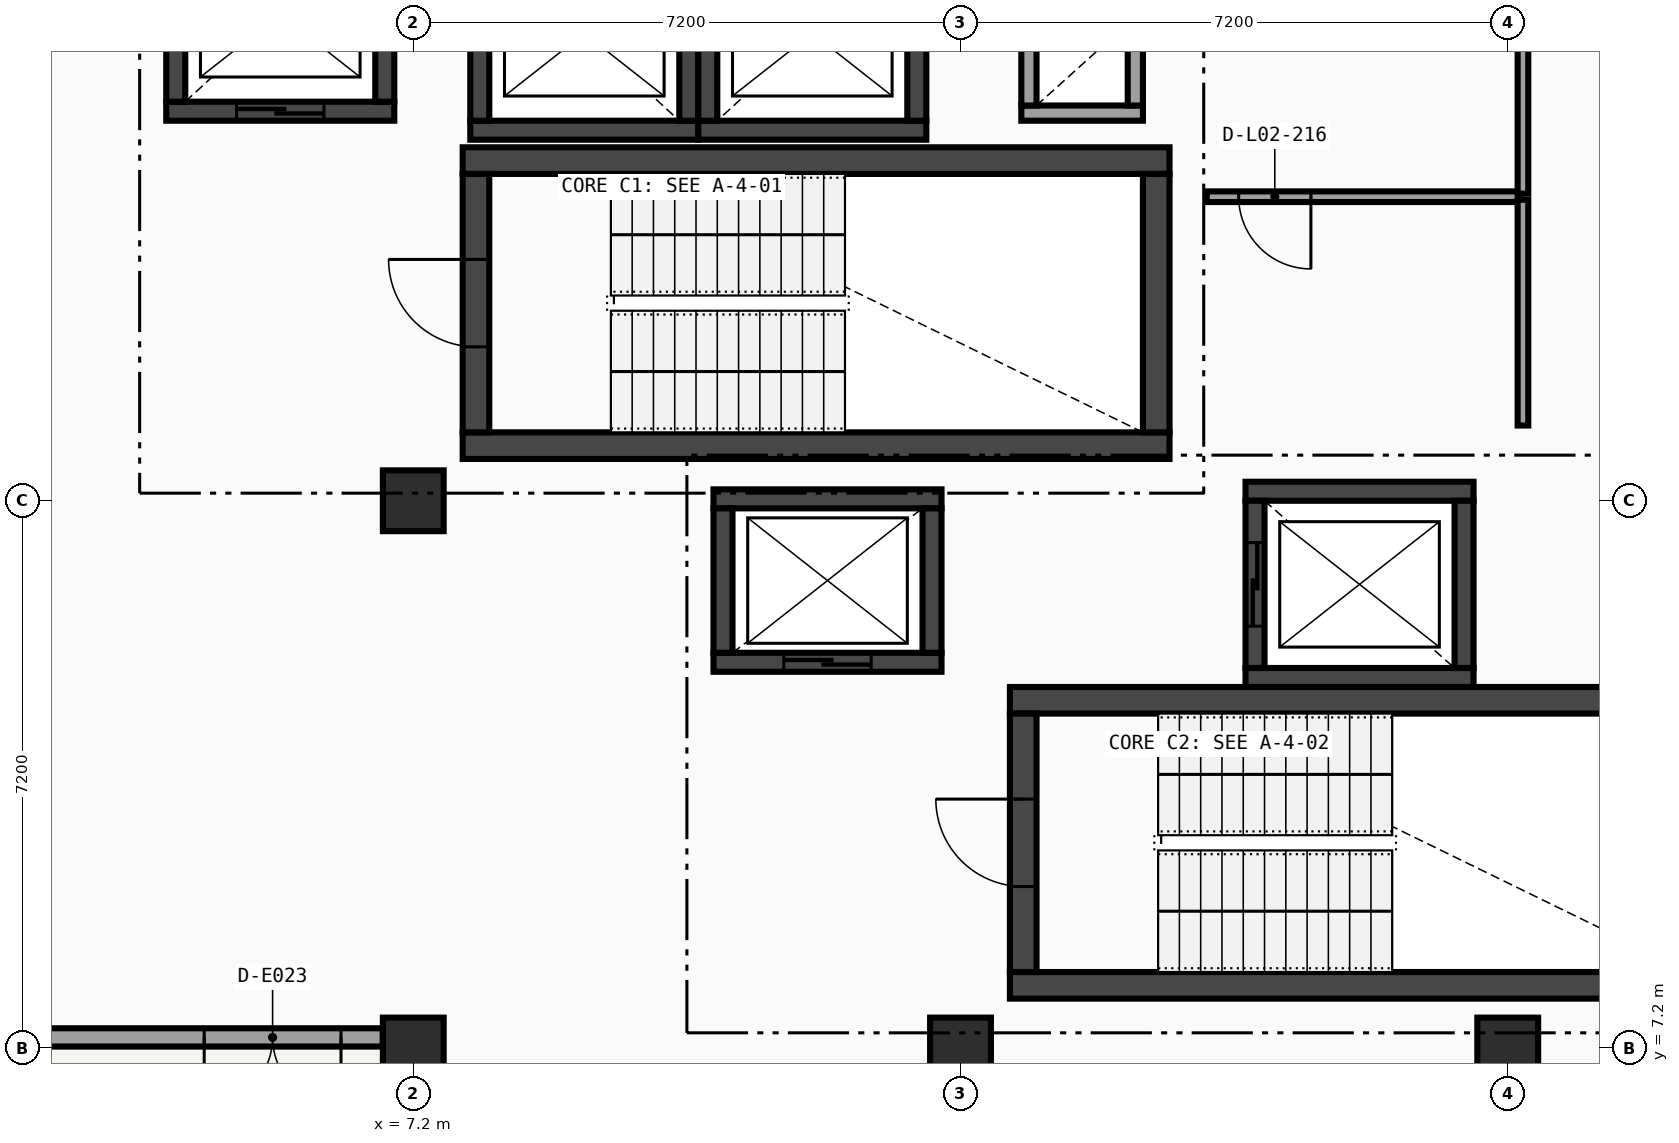
"""IFC4 building model, lengths in metres.
Left out: names, types, materials, properties, quantities, classifications, styles, units other than length and angle.
Written with IfcOpenShell. Run it as: python <this file> out.ifc"""

import sys

from ifc_helpers import new_model, si_unit, direction, frame, frame_2d, origin, origin_2d, place, context, subcontext, project, spatial, rectangle, extrude, element, fill, save


model = new_model("IFC4")
c1 = context("Model", 3, precision=1e-05, world=origin(), true_north=direction((0.0, 1.0)))
c2 = subcontext(c1, "Body", "Model", "MODEL_VIEW")
j1 = project(units=[si_unit("LENGTHUNIT", "METRE"), si_unit("PLANEANGLEUNIT", "RADIAN")], contexts=[c1])
p1 = place(None, origin())
s1 = spatial("IfcSite", under=j1, at=p1, CompositionType="ELEMENT")
p2 = place(p1, origin())
s2 = spatial("IfcBuilding", under=s1, at=p2, CompositionType="ELEMENT")
p3 = place(p2, frame((0.0, 0.0, 10.2)))
s3 = spatial("IfcBuildingStorey", under=s2, at=p3, CompositionType="ELEMENT", Elevation=10.2)
for number, where, z_axis, x_axis in (
    (1, (7.2, 7.2, 0.0), (0.0, 0.0, 1.0), (1.0, 0.0, 0.0)),
    (2, (7.2, 14.4, 0.0), (0.0, 0.0, 1.0), (1.0, 0.0, 0.0)),
    (3, (14.4, 7.2, 0.0), (0.0, 0.0, 1.0), (1.0, 0.0, 0.0)),
    (4, (21.6, 7.2, 0.0), (0.0, 0.0, 1.0), (1.0, 0.0, 0.0)),
):
    element("IfcColumn", number, at=place(p3, frame(where, z_axis=z_axis, x_axis=x_axis)), inside=s3, PredefinedType="COLUMN", context=c2, shape_type="SweptSolid", body=[
        extrude(rectangle(XDim=0.8, YDim=0.8, at=origin_2d()), origin(), (0.0, 0.0, 1.0), 4.5),
    ])
p4 = place(p3, frame((6.799, 7.34, 0.0), z_axis=(0.0, 0.0, 1.0), x_axis=(-1.0, 0.0, 0.0)))
e5 = element("IfcWall", 5, at=p4, inside=s3, PredefinedType="SOLIDWALL", context=c2, shape_type="SweptSolid", body=[
    extrude(rectangle(XDim=6.398, YDim=0.24, at=frame_2d((3.199, 0.0))), origin(), (0.0, 0.0, 1.0), 3.471),
])
p5 = place(p4, frame((0.55, 0.0, 0.0)))
e6 = element("IfcOpeningElement", 6, at=p5, cuts=e5, PredefinedType="OPENING", context=c2, shape_type="SweptSolid", body=[
    extrude(rectangle(XDim=1.8, YDim=2.15, at=frame_2d((0.9, 1.075))), frame((0.0, 0.13, 0.0), z_axis=(0.0, -1.0, 0.0), x_axis=(1.0, 0.0, 0.0)), (0.0, 0.0, 1.0), 0.26),
])
p6 = place(p4, frame((4.548, 0.0, 0.85)))
e7 = element("IfcOpeningElement", 7, at=p6, cuts=e5, PredefinedType="OPENING", context=c2, shape_type="SweptSolid", body=[
    extrude(rectangle(XDim=1.35, YDim=1.85, at=frame_2d((0.675, 0.925))), frame((0.0, 0.13, 0.0), z_axis=(0.0, -1.0, 0.0), x_axis=(1.0, 0.0, 0.0)), (0.0, 0.0, 1.0), 0.26),
])
for number, where, z_axis, x_axis in (
    (8, (7.85, 15.125, 0.0), (0.0, 0.0, 1.0), (1.0, 0.0, 0.0)),
    (9, (17.15, 18.875, 0.0), (0.0, 0.0, 1.0), (-1.0, 0.0, 0.0)),
):
    element("IfcWall", number, at=place(p3, frame(where, z_axis=z_axis, x_axis=x_axis)), inside=s3, PredefinedType="SHEAR", context=c2, shape_type="SweptSolid", body=[
        extrude(rectangle(XDim=9.3, YDim=0.35, at=frame_2d((4.65, 0.0))), origin(), (0.0, 0.0, 1.0), 4.24),
    ])
p7 = place(p3, frame((8.025, 18.7, 0.0), z_axis=(0.0, 0.0, 1.0), x_axis=(0.0, -1.0, 0.0)))
e10 = element("IfcWall", 10, at=p7, inside=s3, PredefinedType="SHEAR", context=c2, shape_type="SweptSolid", body=[
    extrude(rectangle(XDim=3.4, YDim=0.35, at=frame_2d((1.7, 0.0))), origin(), (0.0, 0.0, 1.0), 4.24),
])
p8 = place(p7, frame((1.125, 0.0, 0.0)))
e11 = element("IfcOpeningElement", 11, at=p8, cuts=e10, PredefinedType="OPENING", context=c2, shape_type="SweptSolid", body=[
    extrude(rectangle(XDim=1.15, YDim=2.1, at=frame_2d((0.575, 1.05))), frame((0.0, 0.185, 0.0), z_axis=(0.0, -1.0, 0.0), x_axis=(1.0, 0.0, 0.0)), (0.0, 0.0, 1.0), 0.37),
])
p9 = place(p3, frame((16.975, 15.3, 0.0), z_axis=(0.0, 0.0, 1.0), x_axis=(0.0, 1.0, 0.0)))
e12 = element("IfcWall", 12, at=p9, inside=s3, PredefinedType="SHEAR", context=c2, shape_type="SweptSolid", body=[
    extrude(rectangle(XDim=3.4, YDim=0.35, at=frame_2d((1.7, 0.0))), origin(), (0.0, 0.0, 1.0), 4.24),
])
p10 = place(p3, frame((3.95, 19.525, 0.0), z_axis=(0.0, 0.0, 1.0), x_axis=(1.0, 0.0, 0.0)))
e13 = element("IfcWall", 13, at=p10, inside=s3, PredefinedType="SHEAR", context=c2, shape_type="SweptSolid", body=[
    extrude(rectangle(XDim=3.0, YDim=0.25, at=frame_2d((1.5, 0.0))), origin(), (0.0, 0.0, 1.0), 4.24),
])
p11 = place(p10, frame((0.925, 0.0, 0.0)))
e14 = element("IfcOpeningElement", 14, at=p11, cuts=e13, PredefinedType="OPENING", context=c2, shape_type="SweptSolid", body=[
    extrude(rectangle(XDim=1.15, YDim=2.1, at=frame_2d((0.575, 1.05))), frame((0.0, 0.135, 0.0), z_axis=(0.0, -1.0, 0.0), x_axis=(1.0, 0.0, 0.0)), (0.0, 0.0, 1.0), 0.27),
])
for number, where, z_axis, x_axis in (
    (15, (4.075, 21.95, 0.0), (0.0, 0.0, 1.0), (0.0, -1.0, 0.0)),
    (16, (6.825, 19.65, 0.0), (0.0, 0.0, 1.0), (0.0, 1.0, 0.0)),
):
    element("IfcWall", number, at=place(p3, frame(where, z_axis=z_axis, x_axis=x_axis)), inside=s3, PredefinedType="SHEAR", context=c2, shape_type="SweptSolid", body=[
        extrude(rectangle(XDim=2.3, YDim=0.25, at=frame_2d((1.15, 0.0))), origin(), (0.0, 0.0, 1.0), 4.24),
    ])
p12 = place(p3, frame((7.95, 19.275, 0.0), z_axis=(0.0, 0.0, 1.0), x_axis=(1.0, 0.0, 0.0)))
e17 = element("IfcWall", 17, at=p12, inside=s3, PredefinedType="SHEAR", context=c2, shape_type="SweptSolid", body=[
    extrude(rectangle(XDim=3.0, YDim=0.25, at=frame_2d((1.5, 0.0))), origin(), (0.0, 0.0, 1.0), 4.24),
])
for number, where, z_axis, x_axis in (
    (18, (8.075, 21.7, 0.0), (0.0, 0.0, 1.0), (0.0, -1.0, 0.0)),
    (19, (10.825, 19.4, 0.0), (0.0, 0.0, 1.0), (0.0, 1.0, 0.0)),
):
    element("IfcWall", number, at=place(p3, frame(where, z_axis=z_axis, x_axis=x_axis)), inside=s3, PredefinedType="SHEAR", context=c2, shape_type="SweptSolid", body=[
        extrude(rectangle(XDim=2.3, YDim=0.25, at=frame_2d((1.15, 0.0))), origin(), (0.0, 0.0, 1.0), 4.24),
    ])
p13 = place(p3, frame((10.95, 19.275, 0.0), z_axis=(0.0, 0.0, 1.0), x_axis=(1.0, 0.0, 0.0)))
e20 = element("IfcWall", 20, at=p13, inside=s3, PredefinedType="SHEAR", context=c2, shape_type="SweptSolid", body=[
    extrude(rectangle(XDim=3.0, YDim=0.25, at=frame_2d((1.5, 0.0))), origin(), (0.0, 0.0, 1.0), 4.24),
])
for number, where, z_axis, x_axis in (
    (21, (11.075, 21.7, 0.0), (0.0, 0.0, 1.0), (0.0, -1.0, 0.0)),
    (22, (13.825, 19.4, 0.0), (0.0, 0.0, 1.0), (0.0, 1.0, 0.0)),
):
    element("IfcWall", number, at=place(p3, frame(where, z_axis=z_axis, x_axis=x_axis)), inside=s3, PredefinedType="SHEAR", context=c2, shape_type="SweptSolid", body=[
        extrude(rectangle(XDim=2.3, YDim=0.25, at=frame_2d((1.15, 0.0))), origin(), (0.0, 0.0, 1.0), 4.24),
    ])
for number, where, z_axis, x_axis in (
    (23, (15.05, 8.025, 0.0), (0.0, 0.0, 1.0), (1.0, 0.0, 0.0)),
    (24, (24.35, 11.775, 0.0), (0.0, 0.0, 1.0), (-1.0, 0.0, 0.0)),
):
    element("IfcWall", number, at=place(p3, frame(where, z_axis=z_axis, x_axis=x_axis)), inside=s3, PredefinedType="SHEAR", context=c2, shape_type="SweptSolid", body=[
        extrude(rectangle(XDim=9.3, YDim=0.35, at=frame_2d((4.65, 0.0))), origin(), (0.0, 0.0, 1.0), 4.24),
    ])
p14 = place(p3, frame((15.225, 11.6, 0.0), z_axis=(0.0, 0.0, 1.0), x_axis=(0.0, -1.0, 0.0)))
e25 = element("IfcWall", 25, at=p14, inside=s3, PredefinedType="SHEAR", context=c2, shape_type="SweptSolid", body=[
    extrude(rectangle(XDim=3.4, YDim=0.35, at=frame_2d((1.7, 0.0))), origin(), (0.0, 0.0, 1.0), 4.24),
])
p15 = place(p14, frame((1.125, 0.0, 0.0)))
e26 = element("IfcOpeningElement", 26, at=p15, cuts=e25, PredefinedType="OPENING", context=c2, shape_type="SweptSolid", body=[
    extrude(rectangle(XDim=1.15, YDim=2.1, at=frame_2d((0.575, 1.05))), frame((0.0, 0.185, 0.0), z_axis=(0.0, -1.0, 0.0), x_axis=(1.0, 0.0, 0.0)), (0.0, 0.0, 1.0), 0.37),
])
p16 = place(p3, frame((11.15, 12.275, 0.0), z_axis=(0.0, 0.0, 1.0), x_axis=(1.0, 0.0, 0.0)))
e27 = element("IfcWall", 27, at=p16, inside=s3, PredefinedType="SHEAR", context=c2, shape_type="SweptSolid", body=[
    extrude(rectangle(XDim=3.0, YDim=0.25, at=frame_2d((1.5, 0.0))), origin(), (0.0, 0.0, 1.0), 4.24),
])
p17 = place(p16, frame((0.925, 0.0, 0.0)))
e28 = element("IfcOpeningElement", 28, at=p17, cuts=e27, PredefinedType="OPENING", context=c2, shape_type="SweptSolid", body=[
    extrude(rectangle(XDim=1.15, YDim=2.1, at=frame_2d((0.575, 1.05))), frame((0.0, 0.135, 0.0), z_axis=(0.0, -1.0, 0.0), x_axis=(1.0, 0.0, 0.0)), (0.0, 0.0, 1.0), 0.27),
])
p18 = place(p3, frame((14.15, 14.425, 0.0), z_axis=(0.0, 0.0, 1.0), x_axis=(-1.0, 0.0, 0.0)))
e29 = element("IfcWall", 29, at=p18, inside=s3, PredefinedType="SHEAR", context=c2, shape_type="SweptSolid", body=[
    extrude(rectangle(XDim=3.0, YDim=0.25, at=frame_2d((1.5, 0.0))), origin(), (0.0, 0.0, 1.0), 4.24),
])
for number, where, z_axis, x_axis in (
    (30, (11.275, 14.3, 0.0), (0.0, 0.0, 1.0), (0.0, -1.0, 0.0)),
    (31, (14.025, 12.4, 0.0), (0.0, 0.0, 1.0), (0.0, 1.0, 0.0)),
):
    element("IfcWall", number, at=place(p3, frame(where, z_axis=z_axis, x_axis=x_axis)), inside=s3, PredefinedType="SHEAR", context=c2, shape_type="SweptSolid", body=[
        extrude(rectangle(XDim=1.9, YDim=0.25, at=frame_2d((0.95, 0.0))), origin(), (0.0, 0.0, 1.0), 4.24),
    ])
for number, where, z_axis, x_axis in (
    (32, (18.15, 12.075, 0.0), (0.0, 0.0, 1.0), (1.0, 0.0, 0.0)),
    (33, (21.15, 14.525, 0.0), (0.0, 0.0, 1.0), (-1.0, 0.0, 0.0)),
):
    element("IfcWall", number, at=place(p3, frame(where, z_axis=z_axis, x_axis=x_axis)), inside=s3, PredefinedType="SHEAR", context=c2, shape_type="SweptSolid", body=[
        extrude(rectangle(XDim=3.0, YDim=0.25, at=frame_2d((1.5, 0.0))), origin(), (0.0, 0.0, 1.0), 4.24),
    ])
p19 = place(p3, frame((18.275, 14.4, 0.0), z_axis=(0.0, 0.0, 1.0), x_axis=(0.0, -1.0, 0.0)))
e34 = element("IfcWall", 34, at=p19, inside=s3, PredefinedType="SHEAR", context=c2, shape_type="SweptSolid", body=[
    extrude(rectangle(XDim=2.2, YDim=0.25, at=frame_2d((1.1, 0.0))), origin(), (0.0, 0.0, 1.0), 4.24),
])
p20 = place(p19, frame((0.55, 0.0, 0.0)))
e35 = element("IfcOpeningElement", 35, at=p20, cuts=e34, PredefinedType="OPENING", context=c2, shape_type="SweptSolid", body=[
    extrude(rectangle(XDim=1.1, YDim=2.1, at=frame_2d((0.55, 1.05))), frame((0.0, 0.135, 0.0), z_axis=(0.0, -1.0, 0.0), x_axis=(1.0, 0.0, 0.0)), (0.0, 0.0, 1.0), 0.27),
])
p21 = place(p3, frame((21.025, 12.2, 0.0), z_axis=(0.0, 0.0, 1.0), x_axis=(0.0, 1.0, 0.0)))
e36 = element("IfcWall", 36, at=p21, inside=s3, PredefinedType="SHEAR", context=c2, shape_type="SweptSolid", body=[
    extrude(rectangle(XDim=2.2, YDim=0.25, at=frame_2d((1.1, 0.0))), origin(), (0.0, 0.0, 1.0), 4.24),
])
p22 = place(p3, frame((15.2, 19.5, 0.0), z_axis=(0.0, 0.0, 1.0), x_axis=(1.0, 0.0, 0.0)))
e37 = element("IfcWall", 37, at=p22, inside=s3, PredefinedType="SOLIDWALL", context=c2, shape_type="SweptSolid", body=[
    extrude(rectangle(XDim=1.6, YDim=0.2, at=frame_2d((0.8, 0.0))), origin(), (0.0, 0.0, 1.0), 4.24),
])
for number, where, z_axis, x_axis in (
    (38, (15.3, 20.68, 0.0), (0.0, 0.0, 1.0), (0.0, -1.0, 0.0)),
    (39, (16.7, 19.6, 0.0), (0.0, 0.0, 1.0), (0.0, 1.0, 0.0)),
):
    element("IfcWall", number, at=place(p3, frame(where, z_axis=z_axis, x_axis=x_axis)), inside=s3, PredefinedType="SOLIDWALL", context=c2, shape_type="SweptSolid", body=[
        extrude(rectangle(XDim=1.08, YDim=0.2, at=frame_2d((0.54, 0.0))), origin(), (0.0, 0.0, 1.0), 4.24),
    ])
p23 = place(p3, frame((17.64, 18.4, 0.0), z_axis=(0.0, 0.0, 1.0), x_axis=(1.0, 0.0, 0.0)))
e40 = element("IfcWall", 40, at=p23, inside=s3, PredefinedType="PARTITIONING", context=c2, shape_type="SweptSolid", body=[
    extrude(rectangle(XDim=4.12, YDim=0.14, at=frame_2d((2.06, 0.0))), origin(), (0.0, 0.0, 1.0), 4.24),
])
p24 = place(p23, frame((0.42, 0.0, 0.0)))
e41 = element("IfcOpeningElement", 41, at=p24, cuts=e40, PredefinedType="OPENING", context=c2, shape_type="SweptSolid", body=[
    extrude(rectangle(XDim=0.95, YDim=2.08, at=frame_2d((0.475, 1.04))), frame((0.0, 0.08, 0.0), z_axis=(0.0, -1.0, 0.0), x_axis=(1.0, 0.0, 0.0)), (0.0, 0.0, 1.0), 0.16),
])
p25 = place(p3, frame((21.8, 15.39, 0.0), z_axis=(0.0, 0.0, 1.0), x_axis=(0.0, 1.0, 0.0)))
e42 = element("IfcWall", 42, at=p25, inside=s3, PredefinedType="PARTITIONING", context=c2, shape_type="SweptSolid", body=[
    extrude(rectangle(XDim=2.97, YDim=0.14, at=frame_2d((1.485, 0.0))), origin(), (0.0, 0.0, 1.0), 4.24),
])
p26 = place(p3, frame((21.8, 18.44, 0.0), z_axis=(0.0, 0.0, 1.0), x_axis=(0.0, 1.0, 0.0)))
e43 = element("IfcWall", 43, at=p26, inside=s3, PredefinedType="PARTITIONING", context=c2, shape_type="SweptSolid", body=[
    extrude(rectangle(XDim=3.72, YDim=0.14, at=frame_2d((1.86, 0.0))), origin(), (0.0, 0.0, 1.0), 3.451),
])
p27 = place(p5, origin())
e44 = element("IfcDoor", 44, at=p27, inside=s3, OperationType="DOUBLE_DOOR_SINGLE_SWING", PredefinedType="DOOR", context=c2, shape_type="SweptSolid", body=[
    extrude(rectangle(XDim=1.8, YDim=2.15, at=frame_2d((0.9, 1.075))), frame((0.0, 0.025, 0.0), z_axis=(0.0, -1.0, 0.0), x_axis=(1.0, 0.0, 0.0)), (0.0, 0.0, 1.0), 0.05),
])
fill(e6, e44)
p28 = place(p8, frame((1.15, 0.0, 0.0), z_axis=(0.0, 0.0, 1.0), x_axis=(-1.0, 0.0, 0.0)))
e45 = element("IfcDoor", 45, at=p28, inside=s3, OperationType="SINGLE_SWING_RIGHT", PredefinedType="DOOR", context=c2, shape_type="SweptSolid", body=[
    extrude(rectangle(XDim=1.15, YDim=2.1, at=frame_2d((0.575, 1.05))), frame((0.0, 0.025, 0.0), z_axis=(0.0, -1.0, 0.0), x_axis=(1.0, 0.0, 0.0)), (0.0, 0.0, 1.0), 0.05),
])
fill(e11, e45)
p29 = place(p11, origin())
e46 = element("IfcDoor", 46, at=p29, inside=s3, OperationType="SLIDING_TO_RIGHT", PredefinedType="DOOR", context=c2, shape_type="SweptSolid", body=[
    extrude(rectangle(XDim=1.15, YDim=2.1, at=frame_2d((0.575, 1.05))), frame((0.0, 0.025, 0.0), z_axis=(0.0, -1.0, 0.0), x_axis=(1.0, 0.0, 0.0)), (0.0, 0.0, 1.0), 0.05),
])
fill(e14, e46)
p30 = place(p15, frame((1.15, 0.0, 0.0), z_axis=(0.0, 0.0, 1.0), x_axis=(-1.0, 0.0, 0.0)))
e47 = element("IfcDoor", 47, at=p30, inside=s3, OperationType="SINGLE_SWING_RIGHT", PredefinedType="DOOR", context=c2, shape_type="SweptSolid", body=[
    extrude(rectangle(XDim=1.15, YDim=2.1, at=frame_2d((0.575, 1.05))), frame((0.0, 0.025, 0.0), z_axis=(0.0, -1.0, 0.0), x_axis=(1.0, 0.0, 0.0)), (0.0, 0.0, 1.0), 0.05),
])
fill(e26, e47)
p31 = place(p17, origin())
e48 = element("IfcDoor", 48, at=p31, inside=s3, OperationType="SLIDING_TO_RIGHT", PredefinedType="DOOR", context=c2, shape_type="SweptSolid", body=[
    extrude(rectangle(XDim=1.15, YDim=2.1, at=frame_2d((0.575, 1.05))), frame((0.0, 0.025, 0.0), z_axis=(0.0, -1.0, 0.0), x_axis=(1.0, 0.0, 0.0)), (0.0, 0.0, 1.0), 0.05),
])
fill(e28, e48)
p32 = place(p20, origin())
e49 = element("IfcDoor", 49, at=p32, inside=s3, OperationType="SLIDING_TO_LEFT", PredefinedType="DOOR", context=c2, shape_type="SweptSolid", body=[
    extrude(rectangle(XDim=1.1, YDim=2.1, at=frame_2d((0.55, 1.05))), frame((0.0, 0.025, 0.0), z_axis=(0.0, -1.0, 0.0), x_axis=(1.0, 0.0, 0.0)), (0.0, 0.0, 1.0), 0.05),
])
fill(e35, e49)
p33 = place(p24, origin())
e50 = element("IfcDoor", 50, at=p33, inside=s3, OperationType="SINGLE_SWING_RIGHT", PredefinedType="DOOR", context=c2, shape_type="SweptSolid", body=[
    extrude(rectangle(XDim=0.95, YDim=2.08, at=frame_2d((0.475, 1.04))), frame((0.0, 0.025, 0.0), z_axis=(0.0, -1.0, 0.0), x_axis=(1.0, 0.0, 0.0)), (0.0, 0.0, 1.0), 0.05),
])
fill(e41, e50)
save(model, sys.argv[1])
